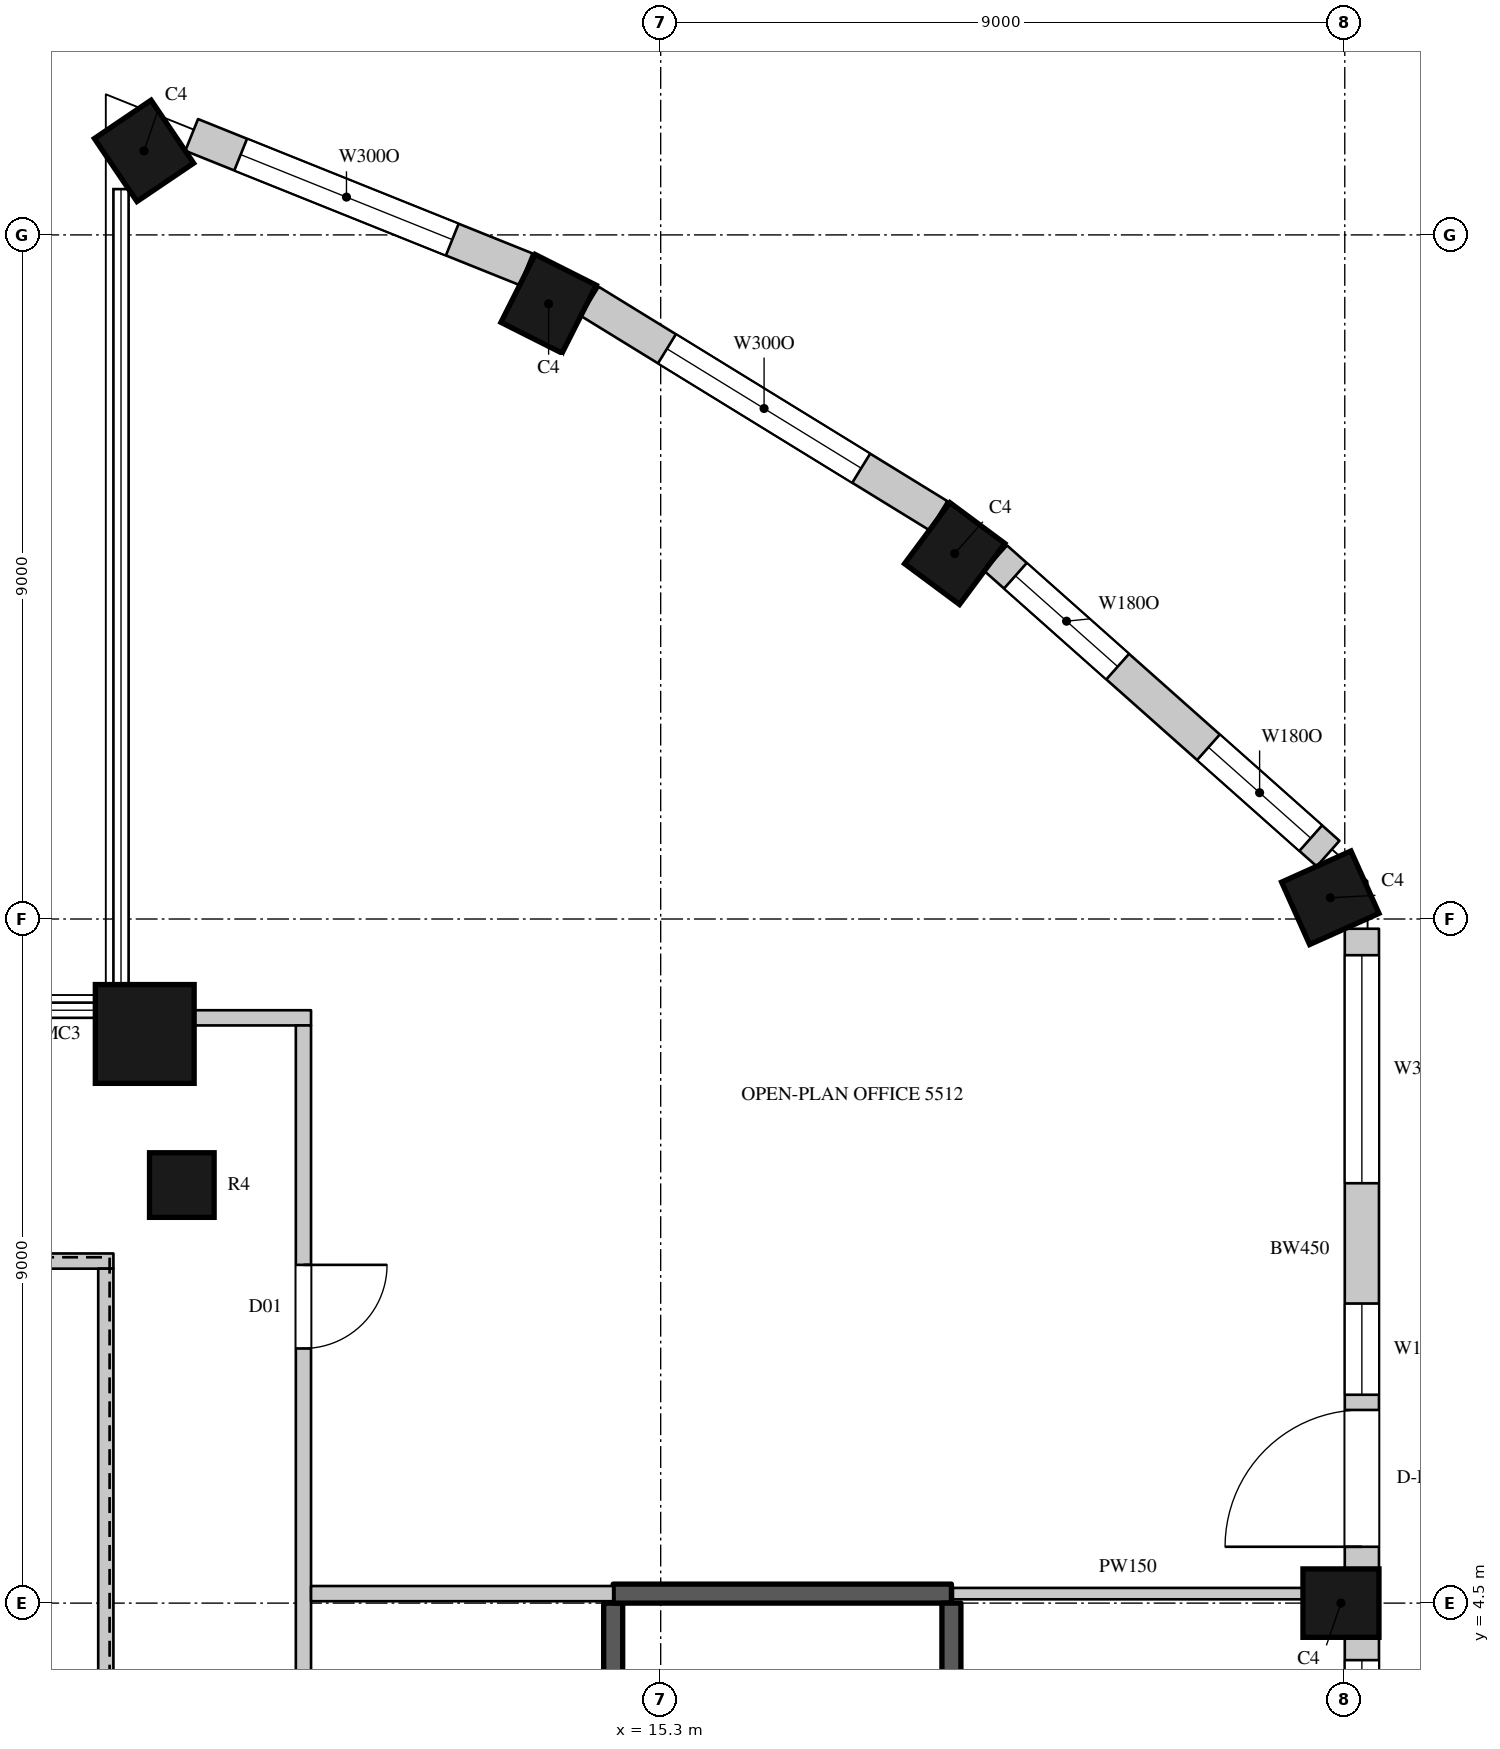
"""IFC4 building model, lengths in metres.
Left out: names, types, materials, properties, quantities, classifications, styles, units other than length and angle.
Written with IfcOpenShell. Run it as: python <this file> out.ifc"""

import sys

from ifc_helpers import new_model, si_unit, direction, frame, frame_2d, origin, origin_2d, place, context, subcontext, project, spatial, rectangle, circle, extrude, element, fill, save


model = new_model("IFC4")
c1 = context("Model", 3, precision=1e-05, world=origin(), true_north=direction((0.0, 1.0)))
c2 = subcontext(c1, "Body", "Model", "MODEL_VIEW")
j1 = project(units=[si_unit("LENGTHUNIT", "METRE"), si_unit("PLANEANGLEUNIT", "RADIAN")], contexts=[c1])
p1 = place(None, origin())
s1 = spatial("IfcSite", under=j1, at=p1, CompositionType="ELEMENT")
p2 = place(p1, origin())
s2 = spatial("IfcBuilding", under=s1, at=p2, CompositionType="ELEMENT")
p3 = place(p2, frame((0.0, 0.0, 247.5)))
s3 = spatial("IfcBuildingStorey", under=s2, at=p3, CompositionType="ELEMENT", Elevation=247.5)
p4 = place(p3, frame((8.503, 23.606, 0.0), z_axis=(0.0, 0.0, 1.0), x_axis=(-0.828469606019, -0.560034027451, 0.0)))
e1 = element("IfcColumn", 1, at=p4, inside=s3, PredefinedType="COLUMN", context=c2, shape_type="SweptSolid", body=[
    extrude(rectangle(XDim=0.9, YDim=1.0, at=origin_2d()), origin(), (0.0, 0.0, 1.0), 4.1),
])
p5 = place(p3, frame((8.512, 11.988, 0.0), z_axis=(0.0, 0.0, 1.0), x_axis=(1.0, 0.0, 0.0)))
e2 = element("IfcColumn", 2, at=p5, inside=s3, PredefinedType="COLUMN", context=c2, shape_type="SweptSolid", body=[
    extrude(circle(Radius=0.65, at=origin_2d()), origin(), (0.0, 0.0, 1.0), 4.1),
])
for number, where, z_axis, x_axis in (
    (3, (24.25, 4.5, 0.0), (0.0, 0.0, 1.0), (0.0, 1.0, 0.0)),
    (4, (24.11, 13.78, 0.0), (0.0, 0.0, 1.0), (-0.41, 0.912, 0.0)),
    (5, (19.168, 18.308, 0.0), (0.0, 0.0, 1.0), (-0.803, 0.596, 0.0)),
    (6, (13.826, 21.594, 0.0), (0.0, 0.0, 1.0), (-0.893, 0.45, 0.0)),
):
    element("IfcColumn", number, at=place(p3, frame(where, z_axis=z_axis, x_axis=x_axis)), inside=s3, PredefinedType="COLUMN", context=c2, shape_type="SweptSolid", body=[
        extrude(rectangle(XDim=0.9, YDim=1.0, at=origin_2d()), origin(), (0.0, 0.0, 1.0), 4.1),
    ])
p6 = place(p3, frame((9.0, 10.0, 0.0), z_axis=(0.0, 0.0, 1.0), x_axis=(1.0, 0.0, 0.0)))
e7 = element("IfcColumn", 7, at=p6, inside=s3, PredefinedType="COLUMN", context=c2, shape_type="SweptSolid", body=[
    extrude(circle(Radius=0.425, at=origin_2d()), origin(), (0.0, 0.0, 1.0), 4.1),
])
p7 = place(p3, frame((24.525, -4.05, 0.0), z_axis=(0.0, 0.0, 1.0), x_axis=(0.0, 1.0, 0.0)))
e8 = element("IfcWall", 8, at=p7, inside=s3, PredefinedType="SOLIDWALL", context=c2, shape_type="SweptSolid", body=[
    extrude(rectangle(XDim=8.1, YDim=0.45, at=frame_2d((4.05, 0.0))), origin(), (0.0, 0.0, 1.0), 3.8),
])
p8 = place(p7, frame((0.3, 0.0, 1.05)))
e9 = element("IfcOpeningElement", 9, at=p8, cuts=e8, PredefinedType="OPENING", context=c2, shape_type="SweptSolid", body=[
    extrude(rectangle(XDim=3.0, YDim=2.4, at=frame_2d((1.5, 1.2))), frame((0.0, 0.235, 0.0), z_axis=(0.0, -1.0, 0.0), x_axis=(1.0, 0.0, 0.0)), (0.0, 0.0, 1.0), 0.47),
])
p9 = place(p7, frame((4.8, 0.0, 1.05)))
e10 = element("IfcOpeningElement", 10, at=p9, cuts=e8, PredefinedType="OPENING", context=c2, shape_type="SweptSolid", body=[
    extrude(rectangle(XDim=3.0, YDim=2.4, at=frame_2d((1.5, 1.2))), frame((0.0, 0.235, 0.0), z_axis=(0.0, -1.0, 0.0), x_axis=(1.0, 0.0, 0.0)), (0.0, 0.0, 1.0), 0.47),
])
p10 = place(p3, frame((24.525, 4.95, 0.0), z_axis=(0.0, 0.0, 1.0), x_axis=(0.0, 1.0, 0.0)))
e11 = element("IfcWall", 11, at=p10, inside=s3, PredefinedType="SOLIDWALL", context=c2, shape_type="SweptSolid", body=[
    extrude(rectangle(XDim=8.422, YDim=0.45, at=frame_2d((4.211, 0.0))), origin(), (0.0, 0.0, 1.0), 3.8),
])
p11 = place(p10, frame((0.291, 0.0, 0.0)))
e12 = element("IfcOpeningElement", 12, at=p11, cuts=e11, PredefinedType="OPENING", context=c2, shape_type="SweptSolid", body=[
    extrude(rectangle(XDim=1.8, YDim=2.4, at=frame_2d((0.9, 1.2))), frame((0.0, 0.235, 0.0), z_axis=(0.0, -1.0, 0.0), x_axis=(1.0, 0.0, 0.0)), (0.0, 0.0, 1.0), 0.47),
])
p12 = place(p10, frame((2.291, 0.0, 1.05)))
e13 = element("IfcOpeningElement", 13, at=p12, cuts=e11, PredefinedType="OPENING", context=c2, shape_type="SweptSolid", body=[
    extrude(rectangle(XDim=1.2, YDim=2.4, at=frame_2d((0.6, 1.2))), frame((0.0, 0.235, 0.0), z_axis=(0.0, -1.0, 0.0), x_axis=(1.0, 0.0, 0.0)), (0.0, 0.0, 1.0), 0.47),
])
p13 = place(p10, frame((5.074, 0.0, 1.05)))
e14 = element("IfcOpeningElement", 14, at=p13, cuts=e11, PredefinedType="OPENING", context=c2, shape_type="SweptSolid", body=[
    extrude(rectangle(XDim=3.0, YDim=2.4, at=frame_2d((1.5, 1.2))), frame((0.0, 0.235, 0.0), z_axis=(0.0, -1.0, 0.0), x_axis=(1.0, 0.0, 0.0)), (0.0, 0.0, 1.0), 0.47),
])
p14 = place(p3, frame((24.081, 14.361, 0.0), z_axis=(0.0, 0.0, 1.0), x_axis=(-0.747570482973, 0.664182484704, 0.0)))
e15 = element("IfcWall", 15, at=p14, inside=s3, PredefinedType="SOLIDWALL", context=c2, shape_type="SweptSolid", body=[
    extrude(rectangle(XDim=5.85, YDim=0.45, at=frame_2d((2.925, 0.0))), origin(), (0.0, 0.0, 1.0), 3.8),
])
p15 = place(p14, frame((0.305, 0.0, 1.05)))
e16 = element("IfcOpeningElement", 16, at=p15, cuts=e15, PredefinedType="OPENING", context=c2, shape_type="SweptSolid", body=[
    extrude(rectangle(XDim=1.8, YDim=2.4, at=frame_2d((0.9, 1.2))), frame((0.0, 0.235, 0.0), z_axis=(0.0, -1.0, 0.0), x_axis=(1.0, 0.0, 0.0)), (0.0, 0.0, 1.0), 0.47),
])
p16 = place(p14, frame((3.703, 0.0, 1.05)))
e17 = element("IfcOpeningElement", 17, at=p16, cuts=e15, PredefinedType="OPENING", context=c2, shape_type="SweptSolid", body=[
    extrude(rectangle(XDim=1.8, YDim=2.4, at=frame_2d((0.9, 1.2))), frame((0.0, 0.235, 0.0), z_axis=(0.0, -1.0, 0.0), x_axis=(1.0, 0.0, 0.0)), (0.0, 0.0, 1.0), 0.47),
])
p17 = place(p3, frame((18.953, 18.806, 0.0), z_axis=(0.0, 0.0, 1.0), x_axis=(-0.851860664503, 0.523768468193, 0.0)))
e18 = element("IfcWall", 18, at=p17, inside=s3, PredefinedType="SOLIDWALL", context=c2, shape_type="SweptSolid", body=[
    extrude(rectangle(XDim=5.384, YDim=0.45, at=frame_2d((2.692, 0.0))), origin(), (0.0, 0.0, 1.0), 3.8),
])
p18 = place(p17, frame((1.192, 0.0, 1.05)))
e19 = element("IfcOpeningElement", 19, at=p18, cuts=e18, PredefinedType="OPENING", context=c2, shape_type="SweptSolid", body=[
    extrude(rectangle(XDim=3.0, YDim=2.4, at=frame_2d((1.5, 1.2))), frame((0.0, 0.235, 0.0), z_axis=(0.0, -1.0, 0.0), x_axis=(1.0, 0.0, 0.0)), (0.0, 0.0, 1.0), 0.47),
])
p19 = place(p3, frame((13.529, 22.048, 0.0), z_axis=(0.0, 0.0, 1.0), x_axis=(-0.927957332619, 0.372686448424, 0.0)))
e20 = element("IfcWall", 20, at=p19, inside=s3, PredefinedType="SOLIDWALL", context=c2, shape_type="SweptSolid", body=[
    extrude(rectangle(XDim=4.741, YDim=0.45, at=frame_2d((2.371, 0.0))), origin(), (0.0, 0.0, 1.0), 3.8),
])
p20 = place(p19, frame((1.047, 0.0, 1.05)))
e21 = element("IfcOpeningElement", 21, at=p20, cuts=e20, PredefinedType="OPENING", context=c2, shape_type="SweptSolid", body=[
    extrude(rectangle(XDim=3.0, YDim=2.4, at=frame_2d((1.5, 1.2))), frame((0.0, 0.235, 0.0), z_axis=(0.0, -1.0, 0.0), x_axis=(1.0, 0.0, 0.0)), (0.0, 0.0, 1.0), 0.47),
])
p21 = place(p3, frame((1.02, 9.0, 0.0), z_axis=(0.0, 0.0, 1.0), x_axis=(1.0, 0.0, 0.0)))
e22 = element("IfcWall", 22, at=p21, inside=s3, PredefinedType="PARTITIONING", context=c2, shape_type="SweptSolid", body=[
    extrude(rectangle(XDim=7.08, YDim=0.2, at=frame_2d((3.54, 0.0))), origin(), (0.0, 0.0, 1.0), 3.8),
])
p22 = place(p3, frame((8.0, -8.9, 0.0), z_axis=(0.0, 0.0, 1.0), x_axis=(0.0, 1.0, 0.0)))
e23 = element("IfcWall", 23, at=p22, inside=s3, PredefinedType="PARTITIONING", context=c2, shape_type="SweptSolid", body=[
    extrude(rectangle(XDim=17.8, YDim=0.2, at=frame_2d((8.9, 0.0))), origin(), (0.0, 0.0, 1.0), 3.8),
])
p23 = place(p3, frame((9.144, 12.2, 0.0), z_axis=(0.0, 0.0, 1.0), x_axis=(1.0, 0.0, 0.0)))
e24 = element("IfcWall", 24, at=p23, inside=s3, PredefinedType="PARTITIONING", context=c2, shape_type="SweptSolid", body=[
    extrude(rectangle(XDim=1.556, YDim=0.2, at=frame_2d((0.778, 0.0))), origin(), (0.0, 0.0, 1.0), 3.8),
])
p24 = place(p3, frame((10.6, -11.6, 0.0), z_axis=(0.0, 0.0, 1.0), x_axis=(0.0, 1.0, 0.0)))
e25 = element("IfcWall", 25, at=p24, inside=s3, PredefinedType="PARTITIONING", context=c2, shape_type="SweptSolid", body=[
    extrude(rectangle(XDim=23.7, YDim=0.2, at=frame_2d((11.85, 0.0))), origin(), (0.0, 0.0, 1.0), 3.8),
])
p25 = place(p24, frame((9.45, 0.0, 0.0)))
e26 = element("IfcOpeningElement", 26, at=p25, cuts=e25, PredefinedType="OPENING", context=c2, shape_type="SweptSolid", body=[
    extrude(rectangle(XDim=1.5, YDim=2.4, at=frame_2d((0.75, 1.2))), frame((0.0, 0.11, 0.0), z_axis=(0.0, -1.0, 0.0), x_axis=(1.0, 0.0, 0.0)), (0.0, 0.0, 1.0), 0.22),
])
p26 = place(p24, frame((19.45, 0.0, 0.0)))
e27 = element("IfcOpeningElement", 27, at=p26, cuts=e25, PredefinedType="OPENING", context=c2, shape_type="SweptSolid", body=[
    extrude(rectangle(XDim=1.1, YDim=2.4, at=frame_2d((0.55, 1.2))), frame((0.0, 0.11, 0.0), z_axis=(0.0, -1.0, 0.0), x_axis=(1.0, 0.0, 0.0)), (0.0, 0.0, 1.0), 0.22),
])
p27 = place(p24, frame((4.6, 0.0, 0.0)))
e28 = element("IfcOpeningElement", 28, at=p27, cuts=e25, PredefinedType="OPENING", context=c2, shape_type="SweptSolid", body=[
    extrude(rectangle(XDim=1.1, YDim=2.4, at=frame_2d((0.55, 1.2))), frame((0.0, 0.11, 0.0), z_axis=(0.0, -1.0, 0.0), x_axis=(1.0, 0.0, 0.0)), (0.0, 0.0, 1.0), 0.22),
])
p28 = place(p3, frame((10.7, 4.625, 0.0), z_axis=(0.0, 0.0, 1.0), x_axis=(1.0, 0.0, 0.0)))
e29 = element("IfcWall", 29, at=p28, inside=s3, PredefinedType="PARTITIONING", context=c2, shape_type="SweptSolid", body=[
    extrude(rectangle(XDim=3.975, YDim=0.2, at=frame_2d((1.988, 0.0))), origin(), (0.0, 0.0, 1.0), 3.8),
])
p29 = place(p3, frame((19.145, 4.625, 0.0), z_axis=(0.0, 0.0, 1.0), x_axis=(1.0, 0.0, 0.0)))
e30 = element("IfcWall", 30, at=p29, inside=s3, PredefinedType="PARTITIONING", context=c2, shape_type="SweptSolid", body=[
    extrude(rectangle(XDim=4.605, YDim=0.15, at=frame_2d((2.302, 0.0))), origin(), (0.0, 0.0, 1.0), 3.8),
])
p30 = place(p3, frame((14.675, -4.5, 0.0), z_axis=(0.0, 0.0, 1.0), x_axis=(0.0, 1.0, 0.0)))
e31 = element("IfcWall", 31, at=p30, inside=s3, PredefinedType="SHEAR", context=c2, shape_type="SweptSolid", body=[
    extrude(rectangle(XDim=9.0, YDim=0.25, at=frame_2d((4.5, 0.0))), origin(), (0.0, 0.0, 1.0), 3.8),
])
p31 = place(p30, frame((0.45, 0.0, 0.0)))
e32 = element("IfcOpeningElement", 32, at=p31, cuts=e31, PredefinedType="OPENING", context=c2, shape_type="SweptSolid", body=[
    extrude(rectangle(XDim=1.1, YDim=2.2, at=frame_2d((0.55, 1.1))), frame((0.0, 0.135, 0.0), z_axis=(0.0, -1.0, 0.0), x_axis=(1.0, 0.0, 0.0)), (0.0, 0.0, 1.0), 0.27),
])
p32 = place(p3, frame((14.675, 4.625, 0.0), z_axis=(0.0, 0.0, 1.0), x_axis=(1.0, 0.0, 0.0)))
e33 = element("IfcWall", 33, at=p32, inside=s3, PredefinedType="SHEAR", context=c2, shape_type="SweptSolid", body=[
    extrude(rectangle(XDim=4.45, YDim=0.25, at=frame_2d((2.225, 0.0))), origin(), (0.0, 0.0, 1.0), 3.8),
])
p33 = place(p3, frame((19.125, -4.5, 0.0), z_axis=(0.0, 0.0, 1.0), x_axis=(0.0, 1.0, 0.0)))
e34 = element("IfcWall", 34, at=p33, inside=s3, PredefinedType="SHEAR", context=c2, shape_type="SweptSolid", body=[
    extrude(rectangle(XDim=9.0, YDim=0.25, at=frame_2d((4.5, 0.0))), origin(), (0.0, 0.0, 1.0), 3.8),
])
p34 = place(p9, origin())
e35 = element("IfcWindow", 35, at=p34, inside=s3, PartitioningType="SINGLE_PANEL", PredefinedType="WINDOW", context=c2, shape_type="SweptSolid", body=[
    extrude(rectangle(XDim=3.0, YDim=2.4, at=frame_2d((1.5, 1.2))), frame((0.0, 0.135, 0.0), z_axis=(0.0, -1.0, 0.0), x_axis=(1.0, 0.0, 0.0)), (0.0, 0.0, 1.0), 0.06),
])
fill(e10, e35)
p35 = place(p11, origin())
e36 = element("IfcDoor", 36, at=p35, inside=s3, OperationType="SLIDING_TO_LEFT", PredefinedType="DOOR", context=c2, shape_type="SweptSolid", body=[
    extrude(rectangle(XDim=1.8, YDim=2.4, at=frame_2d((0.9, 1.2))), frame((0.0, 0.13, 0.0), z_axis=(0.0, -1.0, 0.0), x_axis=(1.0, 0.0, 0.0)), (0.0, 0.0, 1.0), 0.05),
])
fill(e12, e36)
p36 = place(p12, origin())
e37 = element("IfcWindow", 37, at=p36, inside=s3, PartitioningType="SINGLE_PANEL", PredefinedType="WINDOW", context=c2, shape_type="SweptSolid", body=[
    extrude(rectangle(XDim=1.2, YDim=2.4, at=frame_2d((0.6, 1.2))), frame((0.0, 0.135, 0.0), z_axis=(0.0, -1.0, 0.0), x_axis=(1.0, 0.0, 0.0)), (0.0, 0.0, 1.0), 0.06),
])
fill(e13, e37)
p37 = place(p13, origin())
e38 = element("IfcWindow", 38, at=p37, inside=s3, PartitioningType="SINGLE_PANEL", PredefinedType="WINDOW", context=c2, shape_type="SweptSolid", body=[
    extrude(rectangle(XDim=3.0, YDim=2.4, at=frame_2d((1.5, 1.2))), frame((0.0, 0.135, 0.0), z_axis=(0.0, -1.0, 0.0), x_axis=(1.0, 0.0, 0.0)), (0.0, 0.0, 1.0), 0.06),
])
fill(e14, e38)
p38 = place(p15, origin())
e39 = element("IfcWindow", 39, at=p38, inside=s3, PartitioningType="SINGLE_PANEL", PredefinedType="WINDOW", context=c2, shape_type="SweptSolid", body=[
    extrude(rectangle(XDim=1.8, YDim=2.4, at=frame_2d((0.9, 1.2))), frame((0.0, 0.135, 0.0), z_axis=(0.0, -1.0, 0.0), x_axis=(1.0, 0.0, 0.0)), (0.0, 0.0, 1.0), 0.06),
])
fill(e16, e39)
p39 = place(p16, origin())
e40 = element("IfcWindow", 40, at=p39, inside=s3, PartitioningType="SINGLE_PANEL", PredefinedType="WINDOW", context=c2, shape_type="SweptSolid", body=[
    extrude(rectangle(XDim=1.8, YDim=2.4, at=frame_2d((0.9, 1.2))), frame((0.0, 0.135, 0.0), z_axis=(0.0, -1.0, 0.0), x_axis=(1.0, 0.0, 0.0)), (0.0, 0.0, 1.0), 0.06),
])
fill(e17, e40)
p40 = place(p18, origin())
e41 = element("IfcWindow", 41, at=p40, inside=s3, PartitioningType="SINGLE_PANEL", PredefinedType="WINDOW", context=c2, shape_type="SweptSolid", body=[
    extrude(rectangle(XDim=3.0, YDim=2.4, at=frame_2d((1.5, 1.2))), frame((0.0, 0.135, 0.0), z_axis=(0.0, -1.0, 0.0), x_axis=(1.0, 0.0, 0.0)), (0.0, 0.0, 1.0), 0.06),
])
fill(e19, e41)
p41 = place(p20, origin())
e42 = element("IfcWindow", 42, at=p41, inside=s3, PartitioningType="SINGLE_PANEL", PredefinedType="WINDOW", context=c2, shape_type="SweptSolid", body=[
    extrude(rectangle(XDim=3.0, YDim=2.4, at=frame_2d((1.5, 1.2))), frame((0.0, 0.135, 0.0), z_axis=(0.0, -1.0, 0.0), x_axis=(1.0, 0.0, 0.0)), (0.0, 0.0, 1.0), 0.06),
])
fill(e21, e42)
p42 = place(p26, origin())
e43 = element("IfcDoor", 43, at=p42, inside=s3, OperationType="SINGLE_SWING_LEFT", PredefinedType="DOOR", context=c2, shape_type="SweptSolid", body=[
    extrude(rectangle(XDim=1.1, YDim=2.4, at=frame_2d((0.55, 1.2))), frame((0.0, 0.025, 0.0), z_axis=(0.0, -1.0, 0.0), x_axis=(1.0, 0.0, 0.0)), (0.0, 0.0, 1.0), 0.05),
])
fill(e27, e43)
save(model, sys.argv[1])
